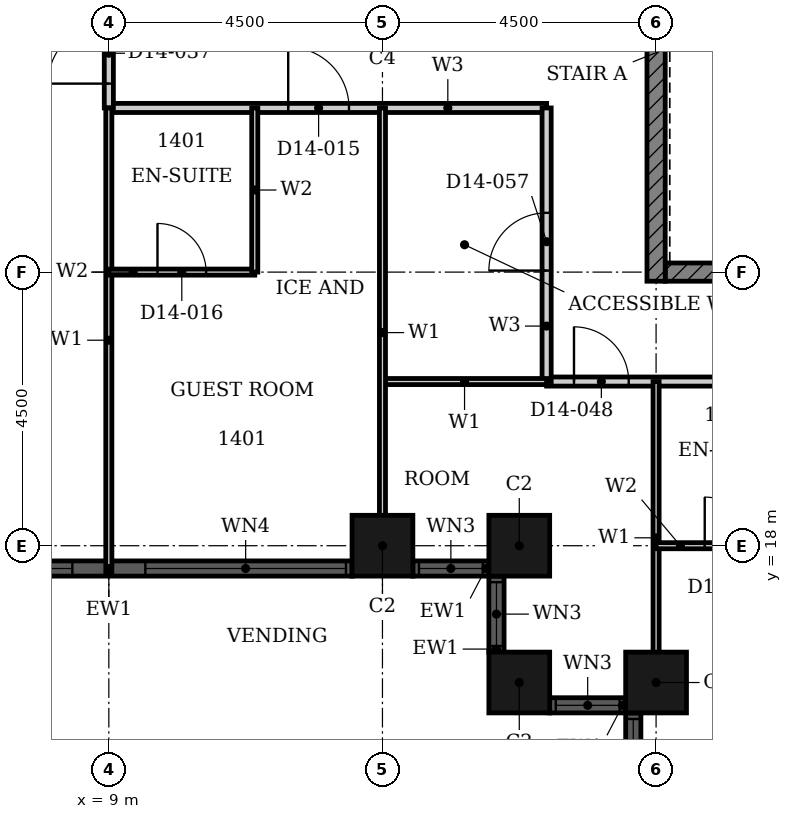
"""IFC4 building model, lengths in metres.
Left out: names, types, materials, properties, quantities, classifications, styles, units other than length and angle.
Written with IfcOpenShell. Run it as: python <this file> out.ifc"""

import sys

from ifc_helpers import new_model, si_unit, direction, frame, frame_2d, origin, origin_2d, place, context, subcontext, project, spatial, rectangle, hollow_rectangle, extrude, element, fill, save


model = new_model("IFC4")
c1 = context("Model", 3, precision=1e-05, world=origin(), true_north=direction((0.0, 1.0)))
c2 = subcontext(c1, "Body", "Model", "MODEL_VIEW")
j1 = project(units=[si_unit("LENGTHUNIT", "METRE"), si_unit("PLANEANGLEUNIT", "RADIAN")], contexts=[c1])
p1 = place(None, origin())
s1 = spatial("IfcSite", under=j1, at=p1, CompositionType="ELEMENT")
p2 = place(p1, origin())
s2 = spatial("IfcBuilding", under=s1, at=p2, CompositionType="ELEMENT")
p3 = place(p2, frame((0.0, 0.0, 63.6)))
s3 = spatial("IfcBuildingStorey", under=s2, at=p3, CompositionType="ELEMENT", Elevation=63.6)
for number, where, z_axis, x_axis in (
    (1, (13.5, 18.0, 0.0), (0.0, 0.0, 1.0), (1.0, 0.0, 0.0)),
    (2, (15.75, 18.0, 0.0), (0.0, 0.0, 1.0), (1.0, 0.0, 0.0)),
    (3, (15.75, 15.75, 0.0), (0.0, 0.0, 1.0), (1.0, 0.0, 0.0)),
    (4, (18.0, 15.75, 0.0), (0.0, 0.0, 1.0), (1.0, 0.0, 0.0)),
):
    element("IfcColumn", number, at=place(p3, frame(where, z_axis=z_axis, x_axis=x_axis)), inside=s3, PredefinedType="COLUMN", context=c2, shape_type="SweptSolid", body=[
        extrude(hollow_rectangle(XDim=1.0, YDim=1.0, WallThickness=0.032, at=origin_2d()), origin(), (0.0, 0.0, 1.0), 3.6),
    ])
p4 = place(p3, frame((5.0, 17.625, 0.0), z_axis=(0.0, 0.0, 1.0), x_axis=(1.0, 0.0, 0.0)))
e5 = element("IfcWall", 5, at=p4, inside=s3, PredefinedType="SOLIDWALL", context=c2, shape_type="SweptSolid", body=[
    extrude(rectangle(XDim=8.0, YDim=0.25, at=frame_2d((4.0, 0.0))), origin(), (0.0, 0.0, 1.0), 3.6),
])
p5 = place(p4, frame((0.1, 0.0, 0.9)))
e6 = element("IfcOpeningElement", 6, at=p5, cuts=e5, PredefinedType="OPENING", context=c2, shape_type="SweptSolid", body=[
    extrude(rectangle(XDim=3.3, YDim=2.08, at=frame_2d((1.65, 1.04))), frame((0.0, 0.135, 0.0), z_axis=(0.0, -1.0, 0.0), x_axis=(1.0, 0.0, 0.0)), (0.0, 0.0, 1.0), 0.27),
])
p6 = place(p4, frame((4.6, 0.0, 0.9)))
e7 = element("IfcOpeningElement", 7, at=p6, cuts=e5, PredefinedType="OPENING", context=c2, shape_type="SweptSolid", body=[
    extrude(rectangle(XDim=3.3, YDim=2.08, at=frame_2d((1.65, 1.04))), frame((0.0, 0.135, 0.0), z_axis=(0.0, -1.0, 0.0), x_axis=(1.0, 0.0, 0.0)), (0.0, 0.0, 1.0), 0.27),
])
p7 = place(p3, frame((14.0, 17.625, 0.0), z_axis=(0.0, 0.0, 1.0), x_axis=(1.0, 0.0, 0.0)))
e8 = element("IfcWall", 8, at=p7, inside=s3, PredefinedType="SOLIDWALL", context=c2, shape_type="SweptSolid", body=[
    extrude(rectangle(XDim=1.25, YDim=0.25, at=frame_2d((0.625, 0.0))), origin(), (0.0, 0.0, 1.0), 3.6),
])
p8 = place(p7, frame((0.1, 0.0, 0.9)))
e9 = element("IfcOpeningElement", 9, at=p8, cuts=e8, PredefinedType="OPENING", context=c2, shape_type="SweptSolid", body=[
    extrude(rectangle(XDim=1.05, YDim=2.08, at=frame_2d((0.525, 1.04))), frame((0.0, 0.135, 0.0), z_axis=(0.0, -1.0, 0.0), x_axis=(1.0, 0.0, 0.0)), (0.0, 0.0, 1.0), 0.27),
])
p9 = place(p3, frame((15.375, 17.5, 0.0), z_axis=(0.0, 0.0, 1.0), x_axis=(0.0, -1.0, 0.0)))
e10 = element("IfcWall", 10, at=p9, inside=s3, PredefinedType="SOLIDWALL", context=c2, shape_type="SweptSolid", body=[
    extrude(rectangle(XDim=1.25, YDim=0.25, at=frame_2d((0.625, 0.0))), origin(), (0.0, 0.0, 1.0), 3.6),
])
p10 = place(p9, frame((0.1, 0.0, 0.9)))
e11 = element("IfcOpeningElement", 11, at=p10, cuts=e10, PredefinedType="OPENING", context=c2, shape_type="SweptSolid", body=[
    extrude(rectangle(XDim=1.05, YDim=2.08, at=frame_2d((0.525, 1.04))), frame((0.0, 0.135, 0.0), z_axis=(0.0, -1.0, 0.0), x_axis=(1.0, 0.0, 0.0)), (0.0, 0.0, 1.0), 0.27),
])
p11 = place(p3, frame((16.25, 15.375, 0.0), z_axis=(0.0, 0.0, 1.0), x_axis=(1.0, 0.0, 0.0)))
e12 = element("IfcWall", 12, at=p11, inside=s3, PredefinedType="SOLIDWALL", context=c2, shape_type="SweptSolid", body=[
    extrude(rectangle(XDim=1.25, YDim=0.25, at=frame_2d((0.625, 0.0))), origin(), (0.0, 0.0, 1.0), 3.6),
])
p12 = place(p11, frame((0.1, 0.0, 0.9)))
e13 = element("IfcOpeningElement", 13, at=p12, cuts=e12, PredefinedType="OPENING", context=c2, shape_type="SweptSolid", body=[
    extrude(rectangle(XDim=1.05, YDim=2.08, at=frame_2d((0.525, 1.04))), frame((0.0, 0.135, 0.0), z_axis=(0.0, -1.0, 0.0), x_axis=(1.0, 0.0, 0.0)), (0.0, 0.0, 1.0), 0.27),
])
p13 = place(p3, frame((17.625, 15.25, 0.0), z_axis=(0.0, 0.0, 1.0), x_axis=(0.0, -1.0, 0.0)))
e14 = element("IfcWall", 14, at=p13, inside=s3, PredefinedType="SOLIDWALL", context=c2, shape_type="SweptSolid", body=[
    extrude(rectangle(XDim=1.25, YDim=0.25, at=frame_2d((0.625, 0.0))), origin(), (0.0, 0.0, 1.0), 3.6),
])
p14 = place(p13, frame((0.1, 0.0, 0.9)))
e15 = element("IfcOpeningElement", 15, at=p14, cuts=e14, PredefinedType="OPENING", context=c2, shape_type="SweptSolid", body=[
    extrude(rectangle(XDim=1.05, YDim=2.08, at=frame_2d((0.525, 1.04))), frame((0.0, 0.135, 0.0), z_axis=(0.0, -1.0, 0.0), x_axis=(1.0, 0.0, 0.0)), (0.0, 0.0, 1.0), 0.27),
])
p15 = place(p3, frame((18.15, 22.5, 0.0), z_axis=(0.0, 0.0, 1.0), x_axis=(1.0, 0.0, 0.0)))
e16 = element("IfcWall", 16, at=p15, inside=s3, PredefinedType="SHEAR", context=c2, shape_type="SweptSolid", body=[
    extrude(rectangle(XDim=4.225, YDim=0.3, at=frame_2d((2.113, 0.0))), origin(), (0.0, 0.0, 1.0), 3.3),
])
p16 = place(p3, frame((18.0, 22.35, 0.0), z_axis=(0.0, 0.0, 1.0), x_axis=(0.0, 1.0, 0.0)))
e17 = element("IfcWall", 17, at=p16, inside=s3, PredefinedType="SHEAR", context=c2, shape_type="SweptSolid", body=[
    extrude(rectangle(XDim=9.3, YDim=0.3, at=frame_2d((4.65, 0.0))), origin(), (0.0, 0.0, 1.0), 3.3),
])
p17 = place(p3, frame((16.2, 20.7, 0.0), z_axis=(0.0, 0.0, 1.0), x_axis=(1.0, 0.0, 0.0)))
e18 = element("IfcWall", 18, at=p17, inside=s3, PredefinedType="PARTITIONING", context=c2, shape_type="SweptSolid", body=[
    extrude(rectangle(XDim=13.5, YDim=0.15, at=frame_2d((6.75, 0.0))), origin(), (0.0, 0.0, 1.0), 3.3),
])
p18 = place(p17, frame((4.75, 0.0, 0.0)))
e19 = element("IfcOpeningElement", 19, at=p18, cuts=e18, PredefinedType="OPENING", context=c2, shape_type="SweptSolid", body=[
    extrude(rectangle(XDim=1.0, YDim=2.1, at=frame_2d((0.5, 1.05))), frame((0.0, 0.085, 0.0), z_axis=(0.0, -1.0, 0.0), x_axis=(1.0, 0.0, 0.0)), (0.0, 0.0, 1.0), 0.17),
])
p19 = place(p17, frame((0.45, 0.0, 0.0)))
e20 = element("IfcOpeningElement", 20, at=p19, cuts=e18, PredefinedType="OPENING", context=c2, shape_type="SweptSolid", body=[
    extrude(rectangle(XDim=0.9, YDim=2.1, at=frame_2d((0.45, 1.05))), frame((0.0, 0.085, 0.0), z_axis=(0.0, -1.0, 0.0), x_axis=(1.0, 0.0, 0.0)), (0.0, 0.0, 1.0), 0.17),
])
p20 = place(p17, frame((7.35, 0.0, 0.0)))
e21 = element("IfcOpeningElement", 21, at=p20, cuts=e18, PredefinedType="OPENING", context=c2, shape_type="SweptSolid", body=[
    extrude(rectangle(XDim=0.9, YDim=2.1, at=frame_2d((0.45, 1.05))), frame((0.0, 0.085, 0.0), z_axis=(0.0, -1.0, 0.0), x_axis=(1.0, 0.0, 0.0)), (0.0, 0.0, 1.0), 0.17),
])
p21 = place(p17, frame((10.95, 0.0, 0.0)))
e22 = element("IfcOpeningElement", 22, at=p21, cuts=e18, PredefinedType="OPENING", context=c2, shape_type="SweptSolid", body=[
    extrude(rectangle(XDim=0.9, YDim=2.1, at=frame_2d((0.45, 1.05))), frame((0.0, 0.085, 0.0), z_axis=(0.0, -1.0, 0.0), x_axis=(1.0, 0.0, 0.0)), (0.0, 0.0, 1.0), 0.17),
])
p22 = place(p3, frame((9.0, 25.2, 0.0), z_axis=(0.0, 0.0, 1.0), x_axis=(1.0, 0.0, 0.0)))
e23 = element("IfcWall", 23, at=p22, inside=s3, PredefinedType="PARTITIONING", context=c2, shape_type="SweptSolid", body=[
    extrude(rectangle(XDim=7.2, YDim=0.15, at=frame_2d((3.6, 0.0))), origin(), (0.0, 0.0, 1.0), 3.3),
])
p23 = place(p22, frame((2.95, 0.0, 0.0)))
e24 = element("IfcOpeningElement", 24, at=p23, cuts=e23, PredefinedType="OPENING", context=c2, shape_type="SweptSolid", body=[
    extrude(rectangle(XDim=1.0, YDim=2.1, at=frame_2d((0.5, 1.05))), frame((0.0, 0.085, 0.0), z_axis=(0.0, -1.0, 0.0), x_axis=(1.0, 0.0, 0.0)), (0.0, 0.0, 1.0), 0.17),
])
p24 = place(p3, frame((16.2, 20.7, 0.0), z_axis=(0.0, 0.0, 1.0), x_axis=(0.0, 1.0, 0.0)))
e25 = element("IfcWall", 25, at=p24, inside=s3, PredefinedType="PARTITIONING", context=c2, shape_type="SweptSolid", body=[
    extrude(rectangle(XDim=4.5, YDim=0.15, at=frame_2d((2.25, 0.0))), origin(), (0.0, 0.0, 1.0), 3.3),
])
p25 = place(p24, frame((1.825, 0.0, 0.0)))
e26 = element("IfcOpeningElement", 26, at=p25, cuts=e25, PredefinedType="OPENING", context=c2, shape_type="SweptSolid", body=[
    extrude(rectangle(XDim=0.95, YDim=2.1, at=frame_2d((0.475, 1.05))), frame((0.0, 0.085, 0.0), z_axis=(0.0, -1.0, 0.0), x_axis=(1.0, 0.0, 0.0)), (0.0, 0.0, 1.0), 0.17),
])
p26 = place(p3, frame((9.0, 25.2, 0.0), z_axis=(0.0, 0.0, 1.0), x_axis=(0.0, 1.0, 0.0)))
e27 = element("IfcWall", 27, at=p26, inside=s3, PredefinedType="PARTITIONING", context=c2, shape_type="SweptSolid", body=[
    extrude(rectangle(XDim=1.8, YDim=0.15, at=frame_2d((0.9, 0.0))), origin(), (0.0, 0.0, 1.0), 3.3),
])
p27 = place(p26, frame((0.4, 0.0, 0.0)))
e28 = element("IfcOpeningElement", 28, at=p27, cuts=e27, PredefinedType="OPENING", context=c2, shape_type="SweptSolid", body=[
    extrude(rectangle(XDim=1.0, YDim=2.1, at=frame_2d((0.5, 1.05))), frame((0.0, 0.085, 0.0), z_axis=(0.0, -1.0, 0.0), x_axis=(1.0, 0.0, 0.0)), (0.0, 0.0, 1.0), 0.17),
])
p28 = place(p3, frame((13.5, 20.7, 0.0), z_axis=(0.0, 0.0, 1.0), x_axis=(1.0, 0.0, 0.0)))
e29 = element("IfcWall", 29, at=p28, inside=s3, PredefinedType="PARTITIONING", context=c2, shape_type="SweptSolid", body=[
    extrude(rectangle(XDim=2.7, YDim=0.1, at=frame_2d((1.35, 0.0))), origin(), (0.0, 0.0, 1.0), 3.3),
])
p29 = place(p3, frame((13.5, 17.81, 0.0), z_axis=(0.0, 0.0, 1.0), x_axis=(0.0, 1.0, 0.0)))
e30 = element("IfcWall", 30, at=p29, inside=s3, PredefinedType="PARTITIONING", context=c2, shape_type="SweptSolid", body=[
    extrude(rectangle(XDim=7.39, YDim=0.1, at=frame_2d((3.695, 0.0))), origin(), (0.0, 0.0, 1.0), 2.38),
])
p30 = place(p3, frame((18.0, 15.56, 0.0), z_axis=(0.0, 0.0, 1.0), x_axis=(0.0, 1.0, 0.0)))
e31 = element("IfcWall", 31, at=p30, inside=s3, PredefinedType="PARTITIONING", context=c2, shape_type="SweptSolid", body=[
    extrude(rectangle(XDim=5.14, YDim=0.1, at=frame_2d((2.57, 0.0))), origin(), (0.0, 0.0, 1.0), 3.3),
])
p31 = place(p3, frame((9.0, 17.56, 0.0), z_axis=(0.0, 0.0, 1.0), x_axis=(0.0, 1.0, 0.0)))
e32 = element("IfcWall", 32, at=p31, inside=s3, PredefinedType="PARTITIONING", context=c2, shape_type="SweptSolid", body=[
    extrude(rectangle(XDim=7.64, YDim=0.1, at=frame_2d((3.82, 0.0))), origin(), (0.0, 0.0, 1.0), 3.3),
])
p32 = place(p3, frame((18.0, 18.0, 0.0), z_axis=(0.0, 0.0, 1.0), x_axis=(1.0, 0.0, 0.0)))
e33 = element("IfcWall", 33, at=p32, inside=s3, PredefinedType="PARTITIONING", context=c2, shape_type="SweptSolid", body=[
    extrude(rectangle(XDim=2.4, YDim=0.1, at=frame_2d((1.2, 0.0))), origin(), (0.0, 0.0, 1.0), 3.3),
])
p33 = place(p32, frame((0.8, 0.0, 0.0)))
e34 = element("IfcOpeningElement", 34, at=p33, cuts=e33, PredefinedType="OPENING", context=c2, shape_type="SweptSolid", body=[
    extrude(rectangle(XDim=0.8, YDim=2.1, at=frame_2d((0.4, 1.05))), frame((0.0, 0.06, 0.0), z_axis=(0.0, -1.0, 0.0), x_axis=(1.0, 0.0, 0.0)), (0.0, 0.0, 1.0), 0.12),
])
p34 = place(p3, frame((9.0, 22.5, 0.0), z_axis=(0.0, 0.0, 1.0), x_axis=(1.0, 0.0, 0.0)))
e35 = element("IfcWall", 35, at=p34, inside=s3, PredefinedType="PARTITIONING", context=c2, shape_type="SweptSolid", body=[
    extrude(rectangle(XDim=2.4, YDim=0.1, at=frame_2d((1.2, 0.0))), origin(), (0.0, 0.0, 1.0), 2.58),
])
p35 = place(p34, frame((0.8, 0.0, 0.0)))
e36 = element("IfcOpeningElement", 36, at=p35, cuts=e35, PredefinedType="OPENING", context=c2, shape_type="SweptSolid", body=[
    extrude(rectangle(XDim=0.8, YDim=2.1, at=frame_2d((0.4, 1.05))), frame((0.0, 0.06, 0.0), z_axis=(0.0, -1.0, 0.0), x_axis=(1.0, 0.0, 0.0)), (0.0, 0.0, 1.0), 0.12),
])
p36 = place(p3, frame((11.4, 22.5, 0.0), z_axis=(0.0, 0.0, 1.0), x_axis=(0.0, 1.0, 0.0)))
e37 = element("IfcWall", 37, at=p36, inside=s3, PredefinedType="PARTITIONING", context=c2, shape_type="SweptSolid", body=[
    extrude(rectangle(XDim=2.7, YDim=0.1, at=frame_2d((1.35, 0.0))), origin(), (0.0, 0.0, 1.0), 3.3),
])
p37 = place(p5, origin())
e38 = element("IfcWindow", 38, at=p37, inside=s3, PartitioningType="SINGLE_PANEL", PredefinedType="WINDOW", context=c2, shape_type="SweptSolid", body=[
    extrude(rectangle(XDim=3.3, YDim=2.08, at=frame_2d((1.65, 1.04))), frame((0.0, 0.03, 0.0), z_axis=(0.0, -1.0, 0.0), x_axis=(1.0, 0.0, 0.0)), (0.0, 0.0, 1.0), 0.06),
])
fill(e6, e38)
p38 = place(p6, origin())
e39 = element("IfcWindow", 39, at=p38, inside=s3, PartitioningType="SINGLE_PANEL", PredefinedType="WINDOW", context=c2, shape_type="SweptSolid", body=[
    extrude(rectangle(XDim=3.3, YDim=2.08, at=frame_2d((1.65, 1.04))), frame((0.0, 0.03, 0.0), z_axis=(0.0, -1.0, 0.0), x_axis=(1.0, 0.0, 0.0)), (0.0, 0.0, 1.0), 0.06),
])
fill(e7, e39)
p39 = place(p8, origin())
e40 = element("IfcWindow", 40, at=p39, inside=s3, PartitioningType="SINGLE_PANEL", PredefinedType="WINDOW", context=c2, shape_type="SweptSolid", body=[
    extrude(rectangle(XDim=1.05, YDim=2.08, at=frame_2d((0.525, 1.04))), frame((0.0, 0.03, 0.0), z_axis=(0.0, -1.0, 0.0), x_axis=(1.0, 0.0, 0.0)), (0.0, 0.0, 1.0), 0.06),
])
fill(e9, e40)
p40 = place(p10, origin())
e41 = element("IfcWindow", 41, at=p40, inside=s3, PartitioningType="SINGLE_PANEL", PredefinedType="WINDOW", context=c2, shape_type="SweptSolid", body=[
    extrude(rectangle(XDim=1.05, YDim=2.08, at=frame_2d((0.525, 1.04))), frame((0.0, 0.03, 0.0), z_axis=(0.0, -1.0, 0.0), x_axis=(1.0, 0.0, 0.0)), (0.0, 0.0, 1.0), 0.06),
])
fill(e11, e41)
p41 = place(p12, origin())
e42 = element("IfcWindow", 42, at=p41, inside=s3, PartitioningType="SINGLE_PANEL", PredefinedType="WINDOW", context=c2, shape_type="SweptSolid", body=[
    extrude(rectangle(XDim=1.05, YDim=2.08, at=frame_2d((0.525, 1.04))), frame((0.0, 0.03, 0.0), z_axis=(0.0, -1.0, 0.0), x_axis=(1.0, 0.0, 0.0)), (0.0, 0.0, 1.0), 0.06),
])
fill(e13, e42)
p42 = place(p14, origin())
e43 = element("IfcWindow", 43, at=p42, inside=s3, PartitioningType="SINGLE_PANEL", PredefinedType="WINDOW", context=c2, shape_type="SweptSolid", body=[
    extrude(rectangle(XDim=1.05, YDim=2.08, at=frame_2d((0.525, 1.04))), frame((0.0, 0.03, 0.0), z_axis=(0.0, -1.0, 0.0), x_axis=(1.0, 0.0, 0.0)), (0.0, 0.0, 1.0), 0.06),
])
fill(e15, e43)
p43 = place(p23, origin())
e44 = element("IfcDoor", 44, at=p43, inside=s3, OperationType="SINGLE_SWING_RIGHT", PredefinedType="DOOR", context=c2, shape_type="SweptSolid", body=[
    extrude(rectangle(XDim=1.0, YDim=2.1, at=frame_2d((0.5, 1.05))), frame((0.0, 0.025, 0.0), z_axis=(0.0, -1.0, 0.0), x_axis=(1.0, 0.0, 0.0)), (0.0, 0.0, 1.0), 0.05),
])
fill(e24, e44)
p44 = place(p35, origin())
e45 = element("IfcDoor", 45, at=p44, inside=s3, OperationType="SINGLE_SWING_LEFT", PredefinedType="DOOR", context=c2, shape_type="SweptSolid", body=[
    extrude(rectangle(XDim=0.8, YDim=2.1, at=frame_2d((0.4, 1.05))), frame((0.0, 0.025, 0.0), z_axis=(0.0, -1.0, 0.0), x_axis=(1.0, 0.0, 0.0)), (0.0, 0.0, 1.0), 0.05),
])
fill(e36, e45)
p45 = place(p27, origin())
e46 = element("IfcDoor", 46, at=p45, inside=s3, OperationType="SINGLE_SWING_RIGHT", PredefinedType="DOOR", context=c2, shape_type="SweptSolid", body=[
    extrude(rectangle(XDim=1.0, YDim=2.1, at=frame_2d((0.5, 1.05))), frame((0.0, 0.025, 0.0), z_axis=(0.0, -1.0, 0.0), x_axis=(1.0, 0.0, 0.0)), (0.0, 0.0, 1.0), 0.05),
])
fill(e28, e46)
p46 = place(p33, origin())
e47 = element("IfcDoor", 47, at=p46, inside=s3, OperationType="SINGLE_SWING_RIGHT", PredefinedType="DOOR", context=c2, shape_type="SweptSolid", body=[
    extrude(rectangle(XDim=0.8, YDim=2.1, at=frame_2d((0.4, 1.05))), frame((0.0, 0.025, 0.0), z_axis=(0.0, -1.0, 0.0), x_axis=(1.0, 0.0, 0.0)), (0.0, 0.0, 1.0), 0.05),
])
fill(e34, e47)
p47 = place(p19, origin())
e48 = element("IfcDoor", 48, at=p47, inside=s3, OperationType="SINGLE_SWING_RIGHT", PredefinedType="DOOR", context=c2, shape_type="SweptSolid", body=[
    extrude(rectangle(XDim=0.9, YDim=2.1, at=frame_2d((0.45, 1.05))), frame((0.0, 0.025, 0.0), z_axis=(0.0, -1.0, 0.0), x_axis=(1.0, 0.0, 0.0)), (0.0, 0.0, 1.0), 0.05),
])
fill(e20, e48)
p48 = place(p25, origin())
e49 = element("IfcDoor", 49, at=p48, inside=s3, OperationType="SINGLE_SWING_RIGHT", PredefinedType="DOOR", context=c2, shape_type="SweptSolid", body=[
    extrude(rectangle(XDim=0.95, YDim=2.1, at=frame_2d((0.475, 1.05))), frame((0.0, 0.025, 0.0), z_axis=(0.0, -1.0, 0.0), x_axis=(1.0, 0.0, 0.0)), (0.0, 0.0, 1.0), 0.05),
])
fill(e26, e49)
save(model, sys.argv[1])
